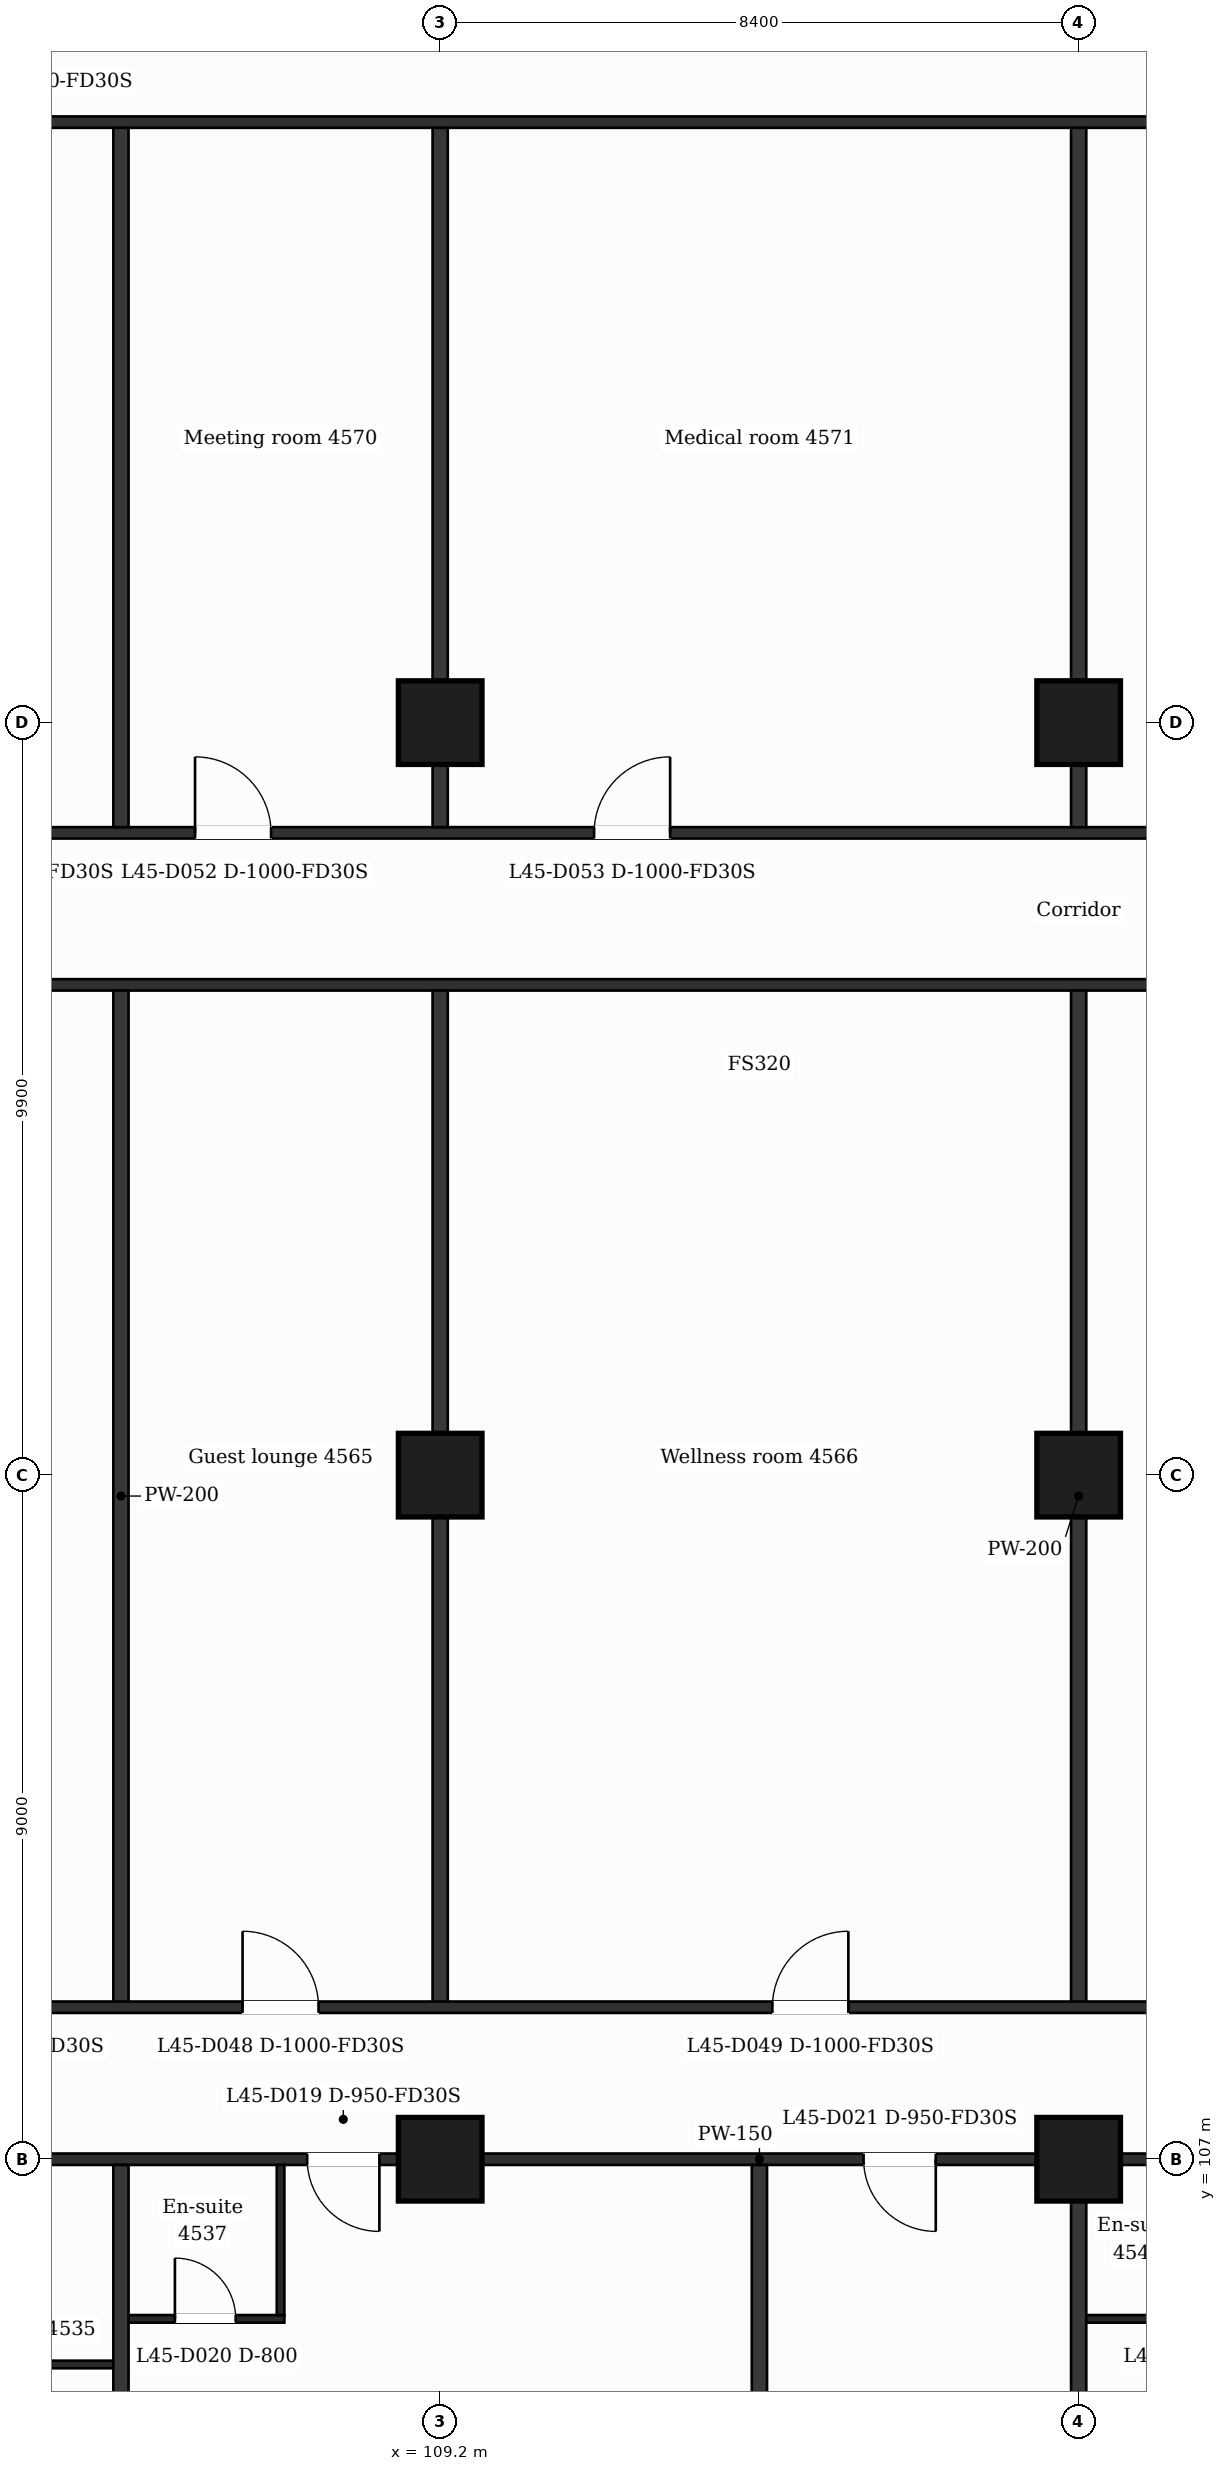
"""IFC4 building model, lengths in metres.
Left out: names, types, materials, properties, quantities, classifications, styles, units other than length and angle.
Written with IfcOpenShell. Run it as: python <this file> out.ifc"""

import sys

from ifc_helpers import new_model, si_unit, direction, frame, frame_2d, origin, origin_2d, place, context, subcontext, project, spatial, rectangle, extrude, element, fill, save


model = new_model("IFC4")
c1 = context("Model", 3, precision=1e-05, world=origin(), true_north=direction((0.0, 1.0)))
c2 = subcontext(c1, "Body", "Model", "MODEL_VIEW")
j1 = project(units=[si_unit("LENGTHUNIT", "METRE"), si_unit("PLANEANGLEUNIT", "RADIAN")], contexts=[c1])
p1 = place(None, origin())
s1 = spatial("IfcSite", under=j1, at=p1, CompositionType="ELEMENT")
p2 = place(p1, origin())
s2 = spatial("IfcBuilding", under=s1, at=p2, CompositionType="ELEMENT")
p3 = place(p2, frame((0.0, 0.0, 188.5)))
s3 = spatial("IfcBuildingStorey", under=s2, at=p3, CompositionType="ELEMENT", Elevation=188.5)
for number, where, z_axis, x_axis in (
    (1, (109.2, 107.0, 0.0), (0.0, 0.0, 1.0), (1.0, 0.0, 0.0)),
    (2, (117.6, 107.0, 0.0), (0.0, 0.0, 1.0), (1.0, 0.0, 0.0)),
    (3, (109.2, 116.0, 0.0), (0.0, 0.0, 1.0), (1.0, 0.0, 0.0)),
    (4, (117.6, 116.0, 0.0), (0.0, 0.0, 1.0), (1.0, 0.0, 0.0)),
    (5, (109.2, 125.9, 0.0), (0.0, 0.0, 1.0), (1.0, 0.0, 0.0)),
    (6, (117.6, 125.9, 0.0), (0.0, 0.0, 1.0), (1.0, 0.0, 0.0)),
):
    element("IfcColumn", number, at=place(p3, frame(where, z_axis=z_axis, x_axis=x_axis)), inside=s3, PredefinedType="COLUMN", context=c2, shape_type="SweptSolid", body=[
        extrude(rectangle(XDim=1.1, YDim=1.1, at=origin_2d()), origin(), (0.0, 0.0, 1.0), 3.7),
    ])
p4 = place(p3, frame((102.55, 104.3, 0.0), z_axis=(0.0, 0.0, 1.0), x_axis=(1.0, 0.0, 0.0)))
e7 = element("IfcWall", 7, at=p4, inside=s3, PredefinedType="PARTITIONING", context=c2, shape_type="SweptSolid", body=[
    extrude(rectangle(XDim=2.45, YDim=0.1, at=frame_2d((1.225, 0.0))), origin(), (0.0, 0.0, 1.0), 3.25),
])
p5 = place(p3, frame((105.0, 104.9, 0.0), z_axis=(0.0, 0.0, 1.0), x_axis=(1.0, 0.0, 0.0)))
e8 = element("IfcWall", 8, at=p5, inside=s3, PredefinedType="PARTITIONING", context=c2, shape_type="SweptSolid", body=[
    extrude(rectangle(XDim=2.15, YDim=0.1, at=frame_2d((1.075, 0.0))), origin(), (0.0, 0.0, 1.0), 3.25),
])
p6 = place(p5, frame((0.71, 0.0, 0.0)))
e9 = element("IfcOpeningElement", 9, at=p6, cuts=e8, PredefinedType="OPENING", context=c2, shape_type="SweptSolid", body=[
    extrude(rectangle(XDim=0.8, YDim=2.1, at=frame_2d((0.4, 1.05))), frame((0.0, 0.06, 0.0), z_axis=(0.0, -1.0, 0.0), x_axis=(1.0, 0.0, 0.0)), (0.0, 0.0, 1.0), 0.12),
])
p7 = place(p3, frame((117.6, 104.9, 0.0), z_axis=(0.0, 0.0, 1.0), x_axis=(1.0, 0.0, 0.0)))
e10 = element("IfcWall", 10, at=p7, inside=s3, PredefinedType="PARTITIONING", context=c2, shape_type="SweptSolid", body=[
    extrude(rectangle(XDim=2.75, YDim=0.1, at=frame_2d((1.375, 0.0))), origin(), (0.0, 0.0, 1.0), 3.25),
])
p8 = place(p7, frame((1.25, 0.0, 0.0)))
e11 = element("IfcOpeningElement", 11, at=p8, cuts=e10, PredefinedType="OPENING", context=c2, shape_type="SweptSolid", body=[
    extrude(rectangle(XDim=0.8, YDim=2.1, at=frame_2d((0.4, 1.05))), frame((0.0, 0.06, 0.0), z_axis=(0.0, -1.0, 0.0), x_axis=(1.0, 0.0, 0.0)), (0.0, 0.0, 1.0), 0.12),
])
p9 = place(p3, frame((87.018, 107.0, 0.0), z_axis=(0.0, 0.0, 1.0), x_axis=(1.0, 0.0, 0.0)))
e12 = element("IfcWall", 12, at=p9, inside=s3, PredefinedType="PARTITIONING", context=c2, shape_type="SweptSolid", body=[
    extrude(rectangle(XDim=52.765, YDim=0.15, at=frame_2d((26.382, 0.0))), origin(), (0.0, 0.0, 1.0), 3.25),
])
p10 = place(p9, frame((0.87, 0.0, 0.0)))
e13 = element("IfcOpeningElement", 13, at=p10, cuts=e12, PredefinedType="OPENING", context=c2, shape_type="SweptSolid", body=[
    extrude(rectangle(XDim=0.95, YDim=2.1, at=frame_2d((0.475, 1.05))), frame((0.0, 0.085, 0.0), z_axis=(0.0, -1.0, 0.0), x_axis=(1.0, 0.0, 0.0)), (0.0, 0.0, 1.0), 0.17),
])
p11 = place(p9, frame((10.757, 0.0, 0.0)))
e14 = element("IfcOpeningElement", 14, at=p11, cuts=e12, PredefinedType="OPENING", context=c2, shape_type="SweptSolid", body=[
    extrude(rectangle(XDim=1.0, YDim=2.1, at=frame_2d((0.5, 1.05))), frame((0.0, 0.085, 0.0), z_axis=(0.0, -1.0, 0.0), x_axis=(1.0, 0.0, 0.0)), (0.0, 0.0, 1.0), 0.17),
])
p12 = place(p9, frame((20.432, 0.0, 0.0)))
e15 = element("IfcOpeningElement", 15, at=p12, cuts=e12, PredefinedType="OPENING", context=c2, shape_type="SweptSolid", body=[
    extrude(rectangle(XDim=0.95, YDim=2.1, at=frame_2d((0.475, 1.05))), frame((0.0, 0.085, 0.0), z_axis=(0.0, -1.0, 0.0), x_axis=(1.0, 0.0, 0.0)), (0.0, 0.0, 1.0), 0.17),
])
p13 = place(p9, frame((27.752, 0.0, 0.0)))
e16 = element("IfcOpeningElement", 16, at=p13, cuts=e12, PredefinedType="OPENING", context=c2, shape_type="SweptSolid", body=[
    extrude(rectangle(XDim=0.95, YDim=2.1, at=frame_2d((0.475, 1.05))), frame((0.0, 0.085, 0.0), z_axis=(0.0, -1.0, 0.0), x_axis=(1.0, 0.0, 0.0)), (0.0, 0.0, 1.0), 0.17),
])
p14 = place(p9, frame((33.557, 0.0, 0.0)))
e17 = element("IfcOpeningElement", 17, at=p14, cuts=e12, PredefinedType="OPENING", context=c2, shape_type="SweptSolid", body=[
    extrude(rectangle(XDim=0.95, YDim=2.1, at=frame_2d((0.475, 1.05))), frame((0.0, 0.085, 0.0), z_axis=(0.0, -1.0, 0.0), x_axis=(1.0, 0.0, 0.0)), (0.0, 0.0, 1.0), 0.17),
])
p15 = place(p9, frame((35.057, 0.0, 0.0)))
e18 = element("IfcOpeningElement", 18, at=p15, cuts=e12, PredefinedType="OPENING", context=c2, shape_type="SweptSolid", body=[
    extrude(rectangle(XDim=0.95, YDim=2.1, at=frame_2d((0.475, 1.05))), frame((0.0, 0.085, 0.0), z_axis=(0.0, -1.0, 0.0), x_axis=(1.0, 0.0, 0.0)), (0.0, 0.0, 1.0), 0.17),
])
p16 = place(p9, frame((45.407, 0.0, 0.0)))
e19 = element("IfcOpeningElement", 19, at=p16, cuts=e12, PredefinedType="OPENING", context=c2, shape_type="SweptSolid", body=[
    extrude(rectangle(XDim=1.0, YDim=2.1, at=frame_2d((0.5, 1.05))), frame((0.0, 0.085, 0.0), z_axis=(0.0, -1.0, 0.0), x_axis=(1.0, 0.0, 0.0)), (0.0, 0.0, 1.0), 0.17),
])
p17 = place(p9, frame((49.285, 0.0, 0.0)))
e20 = element("IfcOpeningElement", 20, at=p17, cuts=e12, PredefinedType="OPENING", context=c2, shape_type="SweptSolid", body=[
    extrude(rectangle(XDim=0.95, YDim=2.1, at=frame_2d((0.475, 1.05))), frame((0.0, 0.085, 0.0), z_axis=(0.0, -1.0, 0.0), x_axis=(1.0, 0.0, 0.0)), (0.0, 0.0, 1.0), 0.17),
])
p18 = place(p3, frame((100.725, 109.0, 0.0), z_axis=(0.0, 0.0, 1.0), x_axis=(1.0, 0.0, 0.0)))
e21 = element("IfcWall", 21, at=p18, inside=s3, PredefinedType="PARTITIONING", context=c2, shape_type="SweptSolid", body=[
    extrude(rectangle(XDim=25.35, YDim=0.15, at=frame_2d((12.675, 0.0))), origin(), (0.0, 0.0, 1.0), 3.25),
])
p19 = place(p18, frame((1.925, 0.0, 0.0)))
e22 = element("IfcOpeningElement", 22, at=p19, cuts=e21, PredefinedType="OPENING", context=c2, shape_type="SweptSolid", body=[
    extrude(rectangle(XDim=1.0, YDim=2.1, at=frame_2d((0.5, 1.05))), frame((0.0, 0.085, 0.0), z_axis=(0.0, -1.0, 0.0), x_axis=(1.0, 0.0, 0.0)), (0.0, 0.0, 1.0), 0.17),
])
p20 = place(p18, frame((5.875, 0.0, 0.0)))
e23 = element("IfcOpeningElement", 23, at=p20, cuts=e21, PredefinedType="OPENING", context=c2, shape_type="SweptSolid", body=[
    extrude(rectangle(XDim=1.0, YDim=2.1, at=frame_2d((0.5, 1.05))), frame((0.0, 0.085, 0.0), z_axis=(0.0, -1.0, 0.0), x_axis=(1.0, 0.0, 0.0)), (0.0, 0.0, 1.0), 0.17),
])
p21 = place(p18, frame((12.845, 0.0, 0.0)))
e24 = element("IfcOpeningElement", 24, at=p21, cuts=e21, PredefinedType="OPENING", context=c2, shape_type="SweptSolid", body=[
    extrude(rectangle(XDim=1.0, YDim=2.1, at=frame_2d((0.5, 1.05))), frame((0.0, 0.085, 0.0), z_axis=(0.0, -1.0, 0.0), x_axis=(1.0, 0.0, 0.0)), (0.0, 0.0, 1.0), 0.17),
])
p22 = place(p18, frame((22.25, 0.0, 0.0)))
e25 = element("IfcOpeningElement", 25, at=p22, cuts=e21, PredefinedType="OPENING", context=c2, shape_type="SweptSolid", body=[
    extrude(rectangle(XDim=1.0, YDim=2.1, at=frame_2d((0.5, 1.05))), frame((0.0, 0.085, 0.0), z_axis=(0.0, -1.0, 0.0), x_axis=(1.0, 0.0, 0.0)), (0.0, 0.0, 1.0), 0.17),
])
p23 = place(p3, frame((100.8, 122.45, 0.0), z_axis=(0.0, 0.0, 1.0), x_axis=(1.0, 0.0, 0.0)))
e26 = element("IfcWall", 26, at=p23, inside=s3, PredefinedType="PARTITIONING", context=c2, shape_type="SweptSolid", body=[
    extrude(rectangle(XDim=25.2, YDim=0.15, at=frame_2d((12.6, 0.0))), origin(), (0.0, 0.0, 1.0), 3.25),
])
p24 = place(p3, frame((100.8, 124.45, 0.0), z_axis=(0.0, 0.0, 1.0), x_axis=(1.0, 0.0, 0.0)))
e27 = element("IfcWall", 27, at=p24, inside=s3, PredefinedType="PARTITIONING", context=c2, shape_type="SweptSolid", body=[
    extrude(rectangle(XDim=25.2, YDim=0.15, at=frame_2d((12.6, 0.0))), origin(), (0.0, 0.0, 1.0), 3.25),
])
p25 = place(p24, frame((0.675, 0.0, 0.0)))
e28 = element("IfcOpeningElement", 28, at=p25, cuts=e27, PredefinedType="OPENING", context=c2, shape_type="SweptSolid", body=[
    extrude(rectangle(XDim=1.0, YDim=2.1, at=frame_2d((0.5, 1.05))), frame((0.0, 0.085, 0.0), z_axis=(0.0, -1.0, 0.0), x_axis=(1.0, 0.0, 0.0)), (0.0, 0.0, 1.0), 0.17),
])
p26 = place(p24, frame((5.175, 0.0, 0.0)))
e29 = element("IfcOpeningElement", 29, at=p26, cuts=e27, PredefinedType="OPENING", context=c2, shape_type="SweptSolid", body=[
    extrude(rectangle(XDim=1.0, YDim=2.1, at=frame_2d((0.5, 1.05))), frame((0.0, 0.085, 0.0), z_axis=(0.0, -1.0, 0.0), x_axis=(1.0, 0.0, 0.0)), (0.0, 0.0, 1.0), 0.17),
])
p27 = place(p24, frame((10.425, 0.0, 0.0)))
e30 = element("IfcOpeningElement", 30, at=p27, cuts=e27, PredefinedType="OPENING", context=c2, shape_type="SweptSolid", body=[
    extrude(rectangle(XDim=1.0, YDim=2.1, at=frame_2d((0.5, 1.05))), frame((0.0, 0.085, 0.0), z_axis=(0.0, -1.0, 0.0), x_axis=(1.0, 0.0, 0.0)), (0.0, 0.0, 1.0), 0.17),
])
p28 = place(p24, frame((22.175, 0.0, 0.0)))
e31 = element("IfcOpeningElement", 31, at=p28, cuts=e27, PredefinedType="OPENING", context=c2, shape_type="SweptSolid", body=[
    extrude(rectangle(XDim=1.0, YDim=2.1, at=frame_2d((0.5, 1.05))), frame((0.0, 0.085, 0.0), z_axis=(0.0, -1.0, 0.0), x_axis=(1.0, 0.0, 0.0)), (0.0, 0.0, 1.0), 0.17),
])
p29 = place(p3, frame((100.725, 133.8, 0.0), z_axis=(0.0, 0.0, 1.0), x_axis=(1.0, 0.0, 0.0)))
e32 = element("IfcWall", 32, at=p29, inside=s3, PredefinedType="PARTITIONING", context=c2, shape_type="SweptSolid", body=[
    extrude(rectangle(XDim=25.35, YDim=0.15, at=frame_2d((12.675, 0.0))), origin(), (0.0, 0.0, 1.0), 3.25),
])
p30 = place(p29, frame((2.3, 0.0, 0.0)))
e33 = element("IfcOpeningElement", 33, at=p30, cuts=e32, PredefinedType="OPENING", context=c2, shape_type="SweptSolid", body=[
    extrude(rectangle(XDim=1.0, YDim=2.1, at=frame_2d((0.5, 1.05))), frame((0.0, 0.085, 0.0), z_axis=(0.0, -1.0, 0.0), x_axis=(1.0, 0.0, 0.0)), (0.0, 0.0, 1.0), 0.17),
])
p31 = place(p3, frame((105.0, 99.79, 0.0), z_axis=(0.0, 0.0, 1.0), x_axis=(0.0, 1.0, 0.0)))
e34 = element("IfcWall", 34, at=p31, inside=s3, PredefinedType="PARTITIONING", context=c2, shape_type="SweptSolid", body=[
    extrude(rectangle(XDim=7.135, YDim=0.2, at=frame_2d((3.567, 0.0))), origin(), (0.0, 0.0, 1.0), 3.25),
])
p32 = place(p3, frame((105.0, 109.075, 0.0), z_axis=(0.0, 0.0, 1.0), x_axis=(0.0, 1.0, 0.0)))
e35 = element("IfcWall", 35, at=p32, inside=s3, PredefinedType="PARTITIONING", context=c2, shape_type="SweptSolid", body=[
    extrude(rectangle(XDim=13.3, YDim=0.2, at=frame_2d((6.65, 0.0))), origin(), (0.0, 0.0, 1.0), 3.25),
])
p33 = place(p3, frame((105.0, 124.525, 0.0), z_axis=(0.0, 0.0, 1.0), x_axis=(0.0, 1.0, 0.0)))
e36 = element("IfcWall", 36, at=p33, inside=s3, PredefinedType="PARTITIONING", context=c2, shape_type="SweptSolid", body=[
    extrude(rectangle(XDim=9.2, YDim=0.2, at=frame_2d((4.6, 0.0))), origin(), (0.0, 0.0, 1.0), 3.25),
])
p34 = place(p3, frame((107.1, 104.95, 0.0), z_axis=(0.0, 0.0, 1.0), x_axis=(0.0, 1.0, 0.0)))
e37 = element("IfcWall", 37, at=p34, inside=s3, PredefinedType="PARTITIONING", context=c2, shape_type="SweptSolid", body=[
    extrude(rectangle(XDim=1.975, YDim=0.1, at=frame_2d((0.988, 0.0))), origin(), (0.0, 0.0, 1.0), 3.25),
])
p35 = place(p3, frame((109.2, 109.075, 0.0), z_axis=(0.0, 0.0, 1.0), x_axis=(0.0, 1.0, 0.0)))
e38 = element("IfcWall", 38, at=p35, inside=s3, PredefinedType="PARTITIONING", context=c2, shape_type="SweptSolid", body=[
    extrude(rectangle(XDim=13.3, YDim=0.2, at=frame_2d((6.65, 0.0))), origin(), (0.0, 0.0, 1.0), 3.25),
])
p36 = place(p3, frame((109.2, 124.525, 0.0), z_axis=(0.0, 0.0, 1.0), x_axis=(0.0, 1.0, 0.0)))
e39 = element("IfcWall", 39, at=p36, inside=s3, PredefinedType="PARTITIONING", context=c2, shape_type="SweptSolid", body=[
    extrude(rectangle(XDim=9.2, YDim=0.2, at=frame_2d((4.6, 0.0))), origin(), (0.0, 0.0, 1.0), 3.25),
])
for number, where, z_axis, x_axis in (
    (40, (113.4, 99.79, 0.0), (0.0, 0.0, 1.0), (0.0, 1.0, 0.0)),
    (41, (117.6, 99.79, 0.0), (0.0, 0.0, 1.0), (0.0, 1.0, 0.0)),
):
    element("IfcWall", number, at=place(p3, frame(where, z_axis=z_axis, x_axis=x_axis)), inside=s3, PredefinedType="PARTITIONING", context=c2, shape_type="SweptSolid", body=[
        extrude(rectangle(XDim=7.135, YDim=0.2, at=frame_2d((3.567, 0.0))), origin(), (0.0, 0.0, 1.0), 3.25),
    ])
p37 = place(p3, frame((117.6, 109.075, 0.0), z_axis=(0.0, 0.0, 1.0), x_axis=(0.0, 1.0, 0.0)))
e42 = element("IfcWall", 42, at=p37, inside=s3, PredefinedType="PARTITIONING", context=c2, shape_type="SweptSolid", body=[
    extrude(rectangle(XDim=13.3, YDim=0.2, at=frame_2d((6.65, 0.0))), origin(), (0.0, 0.0, 1.0), 3.25),
])
p38 = place(p3, frame((117.6, 124.525, 0.0), z_axis=(0.0, 0.0, 1.0), x_axis=(0.0, 1.0, 0.0)))
e43 = element("IfcWall", 43, at=p38, inside=s3, PredefinedType="PARTITIONING", context=c2, shape_type="SweptSolid", body=[
    extrude(rectangle(XDim=9.2, YDim=0.2, at=frame_2d((4.6, 0.0))), origin(), (0.0, 0.0, 1.0), 3.25),
])
p39 = place(p12, origin())
e44 = element("IfcDoor", 44, at=p39, inside=s3, OperationType="SINGLE_SWING_RIGHT", PredefinedType="DOOR", context=c2, shape_type="SweptSolid", body=[
    extrude(rectangle(XDim=0.95, YDim=2.1, at=frame_2d((0.475, 1.05))), frame((0.0, 0.025, 0.0), z_axis=(0.0, -1.0, 0.0), x_axis=(1.0, 0.0, 0.0)), (0.0, 0.0, 1.0), 0.05),
])
fill(e15, e44)
p40 = place(p6, origin())
e45 = element("IfcDoor", 45, at=p40, inside=s3, OperationType="SINGLE_SWING_LEFT", PredefinedType="DOOR", context=c2, shape_type="SweptSolid", body=[
    extrude(rectangle(XDim=0.8, YDim=2.1, at=frame_2d((0.4, 1.05))), frame((0.0, 0.025, 0.0), z_axis=(0.0, -1.0, 0.0), x_axis=(1.0, 0.0, 0.0)), (0.0, 0.0, 1.0), 0.05),
])
fill(e9, e45)
p41 = place(p13, origin())
e46 = element("IfcDoor", 46, at=p41, inside=s3, OperationType="SINGLE_SWING_RIGHT", PredefinedType="DOOR", context=c2, shape_type="SweptSolid", body=[
    extrude(rectangle(XDim=0.95, YDim=2.1, at=frame_2d((0.475, 1.05))), frame((0.0, 0.025, 0.0), z_axis=(0.0, -1.0, 0.0), x_axis=(1.0, 0.0, 0.0)), (0.0, 0.0, 1.0), 0.05),
])
fill(e16, e46)
p42 = place(p20, origin())
e47 = element("IfcDoor", 47, at=p42, inside=s3, OperationType="SINGLE_SWING_LEFT", PredefinedType="DOOR", context=c2, shape_type="SweptSolid", body=[
    extrude(rectangle(XDim=1.0, YDim=2.1, at=frame_2d((0.5, 1.05))), frame((0.0, 0.025, 0.0), z_axis=(0.0, -1.0, 0.0), x_axis=(1.0, 0.0, 0.0)), (0.0, 0.0, 1.0), 0.05),
])
fill(e23, e47)
p43 = place(p21, origin())
e48 = element("IfcDoor", 48, at=p43, inside=s3, OperationType="SINGLE_SWING_RIGHT", PredefinedType="DOOR", context=c2, shape_type="SweptSolid", body=[
    extrude(rectangle(XDim=1.0, YDim=2.1, at=frame_2d((0.5, 1.05))), frame((0.0, 0.025, 0.0), z_axis=(0.0, -1.0, 0.0), x_axis=(1.0, 0.0, 0.0)), (0.0, 0.0, 1.0), 0.05),
])
fill(e24, e48)
p44 = place(p26, origin())
e49 = element("IfcDoor", 49, at=p44, inside=s3, OperationType="SINGLE_SWING_LEFT", PredefinedType="DOOR", context=c2, shape_type="SweptSolid", body=[
    extrude(rectangle(XDim=1.0, YDim=2.1, at=frame_2d((0.5, 1.05))), frame((0.0, 0.025, 0.0), z_axis=(0.0, -1.0, 0.0), x_axis=(1.0, 0.0, 0.0)), (0.0, 0.0, 1.0), 0.05),
])
fill(e29, e49)
p45 = place(p27, origin())
e50 = element("IfcDoor", 50, at=p45, inside=s3, OperationType="SINGLE_SWING_RIGHT", PredefinedType="DOOR", context=c2, shape_type="SweptSolid", body=[
    extrude(rectangle(XDim=1.0, YDim=2.1, at=frame_2d((0.5, 1.05))), frame((0.0, 0.025, 0.0), z_axis=(0.0, -1.0, 0.0), x_axis=(1.0, 0.0, 0.0)), (0.0, 0.0, 1.0), 0.05),
])
fill(e30, e50)
save(model, sys.argv[1])
